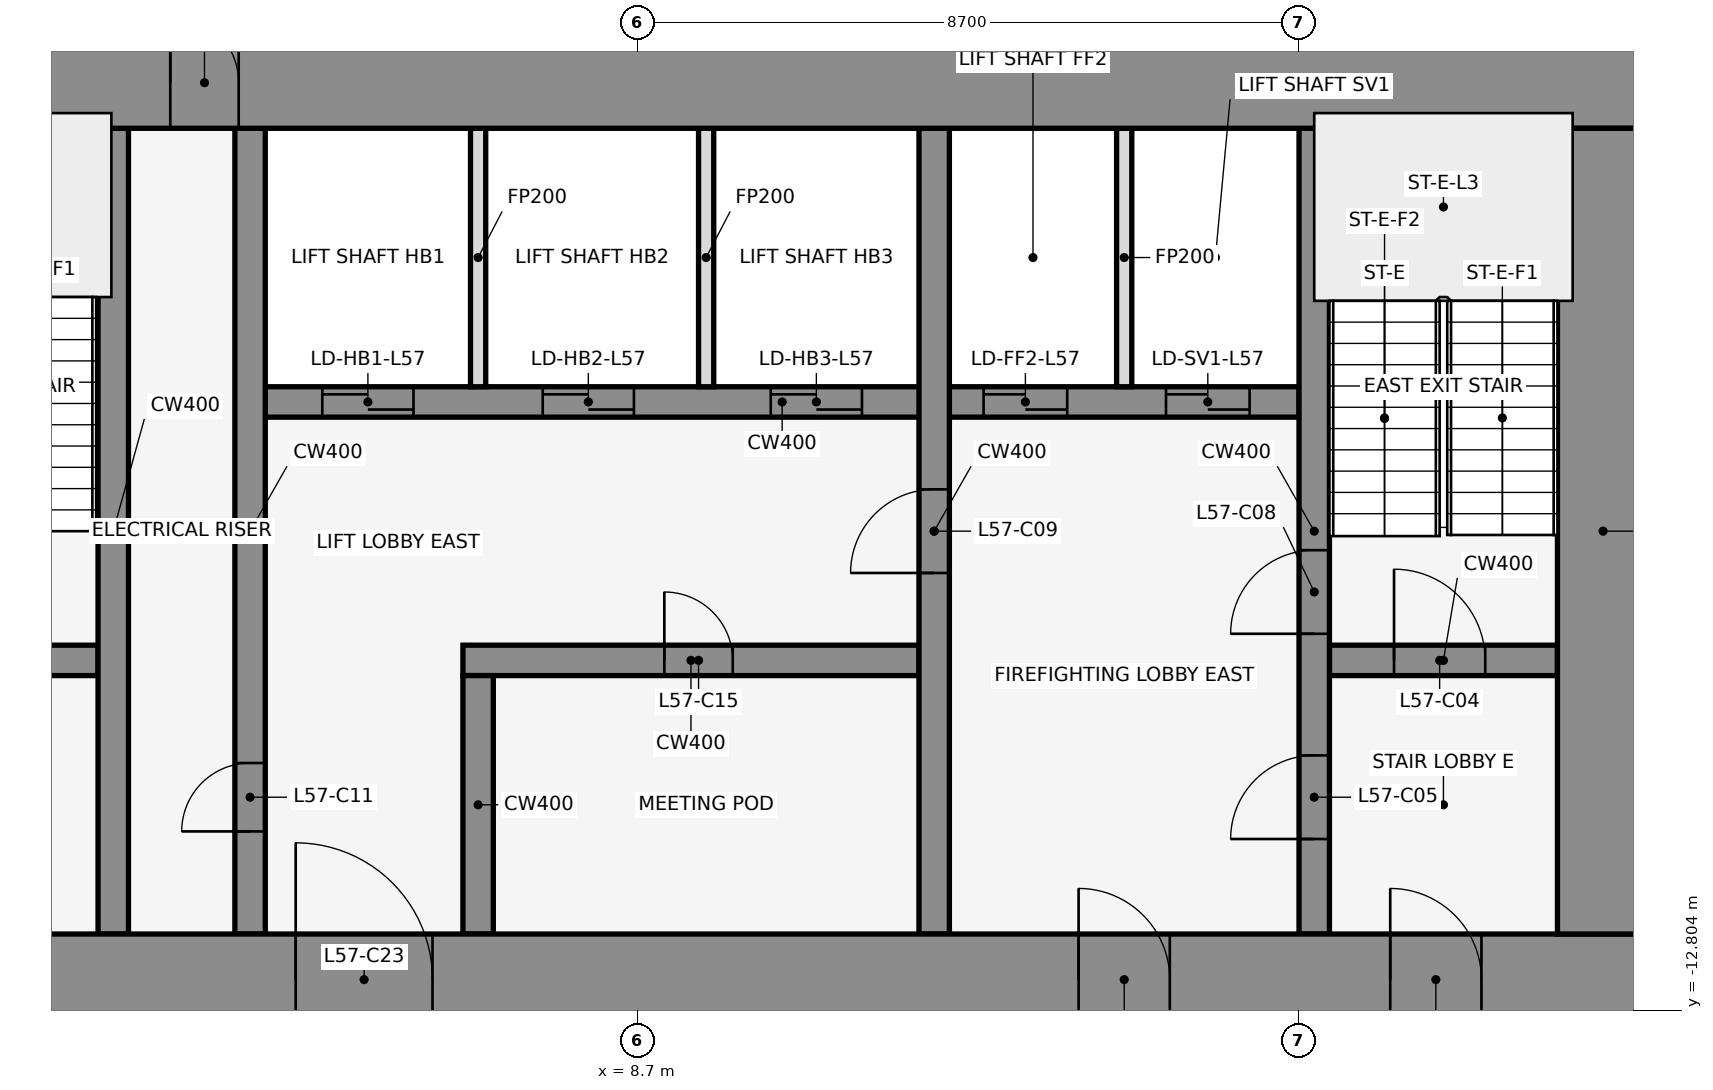
"""IFC4 building model, lengths in metres.
Left out: names, types, materials, properties, quantities, classifications, styles, units other than length and angle.
Written with IfcOpenShell. Run it as: python <this file> out.ifc"""

import sys

from ifc_helpers import new_model, si_unit, direction, frame, frame_2d, origin, place, context, subcontext, project, spatial, rectangle, extrude, element, fill, save


model = new_model("IFC4")
c1 = context("Model", 3, precision=1e-05, world=origin(), true_north=direction((0.0, 1.0)))
c2 = subcontext(c1, "Body", "Model", "MODEL_VIEW")
j1 = project(units=[si_unit("LENGTHUNIT", "METRE"), si_unit("PLANEANGLEUNIT", "RADIAN")], contexts=[c1])
p1 = place(None, origin())
s1 = spatial("IfcSite", under=j1, at=p1, CompositionType="ELEMENT")
p2 = place(p1, origin())
s2 = spatial("IfcBuilding", under=s1, at=p2, CompositionType="ELEMENT")
p3 = place(p2, frame((0.0, 0.0, 254.0)))
s3 = spatial("IfcBuildingStorey", under=s2, at=p3, CompositionType="ELEMENT", Elevation=254.0)
for number, where, z_axis, x_axis in (
    (1, (16.432, -0.105, 0.0), (0.0, 0.0, 1.0), (-0.84, 0.543, 0.0)),
    (2, (1.901, 1.08, 0.0), (0.0, 0.0, 1.0), (-0.84, -0.543, 0.0)),
):
    element("IfcWall", number, at=place(p3, frame(where, z_axis=z_axis, x_axis=x_axis)), inside=s3, PredefinedType="STANDARD", context=c2, shape_type="SweptSolid", body=[
        extrude(rectangle(XDim=2.183, YDim=0.25, at=frame_2d((1.091, 0.0))), origin(), (0.0, 0.0, 1.0), 4.05),
    ])
p4 = place(p3, frame((-1.6, -8.2, 0.0), z_axis=(0.0, 0.0, 1.0), x_axis=(1.0, 0.0, 0.0)))
e3 = element("IfcWall", 3, at=p4, inside=s3, PredefinedType="SHEAR", context=c2, shape_type="SweptSolid", body=[
    extrude(rectangle(XDim=3.2, YDim=0.4, at=frame_2d((1.6, 0.0))), origin(), (0.0, 0.0, 1.0), 4.2),
])
p5 = place(p4, frame((1.05, 0.0, 0.0)))
e4 = element("IfcOpeningElement", 4, at=p5, cuts=e3, PredefinedType="OPENING", context=c2, shape_type="SweptSolid", body=[
    extrude(rectangle(XDim=1.2, YDim=2.1, at=frame_2d((0.6, 1.05))), frame((0.0, 0.212, 0.0), z_axis=(0.0, -1.0, 0.0), x_axis=(1.0, 0.0, 0.0)), (0.0, 0.0, 1.0), 0.424),
])
p6 = place(p3, frame((6.4, -8.2, 0.0), z_axis=(0.0, 0.0, 1.0), x_axis=(1.0, 0.0, 0.0)))
e5 = element("IfcWall", 5, at=p6, inside=s3, PredefinedType="SHEAR", context=c2, shape_type="SweptSolid", body=[
    extrude(rectangle(XDim=6.0, YDim=0.4, at=frame_2d((3.0, 0.0))), origin(), (0.0, 0.0, 1.0), 4.2),
])
p7 = place(p6, frame((2.65, 0.0, 0.0)))
e6 = element("IfcOpeningElement", 6, at=p7, cuts=e5, PredefinedType="OPENING", context=c2, shape_type="SweptSolid", body=[
    extrude(rectangle(XDim=0.9, YDim=2.1, at=frame_2d((0.45, 1.05))), frame((0.0, 0.212, 0.0), z_axis=(0.0, -1.0, 0.0), x_axis=(1.0, 0.0, 0.0)), (0.0, 0.0, 1.0), 0.424),
])
p8 = place(p3, frame((17.8, -8.2, 0.0), z_axis=(0.0, 0.0, 1.0), x_axis=(1.0, 0.0, 0.0)))
e7 = element("IfcWall", 7, at=p8, inside=s3, PredefinedType="SHEAR", context=c2, shape_type="SweptSolid", body=[
    extrude(rectangle(XDim=3.0, YDim=0.4, at=frame_2d((1.5, 0.0))), origin(), (0.0, 0.0, 1.0), 4.2),
])
p9 = place(p8, frame((0.85, 0.0, 0.0)))
e8 = element("IfcOpeningElement", 8, at=p9, cuts=e7, PredefinedType="OPENING", context=c2, shape_type="SweptSolid", body=[
    extrude(rectangle(XDim=1.2, YDim=2.1, at=frame_2d((0.6, 1.05))), frame((0.0, 0.212, 0.0), z_axis=(0.0, -1.0, 0.0), x_axis=(1.0, 0.0, 0.0)), (0.0, 0.0, 1.0), 0.424),
])
p10 = place(p3, frame((3.8, -4.8, 0.0), z_axis=(0.0, 0.0, 1.0), x_axis=(1.0, 0.0, 0.0)))
e9 = element("IfcWall", 9, at=p10, inside=s3, PredefinedType="SHEAR", context=c2, shape_type="SweptSolid", body=[
    extrude(rectangle(XDim=13.6, YDim=0.4, at=frame_2d((6.8, 0.0))), origin(), (0.0, 0.0, 1.0), 4.2),
])
p11 = place(p10, frame((0.75, 0.0, 0.0)))
e10 = element("IfcOpeningElement", 10, at=p11, cuts=e9, PredefinedType="OPENING", context=c2, shape_type="SweptSolid", body=[
    extrude(rectangle(XDim=1.2, YDim=2.1, at=frame_2d((0.6, 1.05))), frame((0.0, 0.212, 0.0), z_axis=(0.0, -1.0, 0.0), x_axis=(1.0, 0.0, 0.0)), (0.0, 0.0, 1.0), 0.424),
])
p12 = place(p10, frame((3.65, 0.0, 0.0)))
e11 = element("IfcOpeningElement", 11, at=p12, cuts=e9, PredefinedType="OPENING", context=c2, shape_type="SweptSolid", body=[
    extrude(rectangle(XDim=1.2, YDim=2.1, at=frame_2d((0.6, 1.05))), frame((0.0, 0.212, 0.0), z_axis=(0.0, -1.0, 0.0), x_axis=(1.0, 0.0, 0.0)), (0.0, 0.0, 1.0), 0.424),
])
p13 = place(p10, frame((6.65, 0.0, 0.0)))
e12 = element("IfcOpeningElement", 12, at=p13, cuts=e9, PredefinedType="OPENING", context=c2, shape_type="SweptSolid", body=[
    extrude(rectangle(XDim=1.2, YDim=2.1, at=frame_2d((0.6, 1.05))), frame((0.0, 0.212, 0.0), z_axis=(0.0, -1.0, 0.0), x_axis=(1.0, 0.0, 0.0)), (0.0, 0.0, 1.0), 0.424),
])
p14 = place(p10, frame((9.45, 0.0, 0.0)))
e13 = element("IfcOpeningElement", 13, at=p14, cuts=e9, PredefinedType="OPENING", context=c2, shape_type="SweptSolid", body=[
    extrude(rectangle(XDim=1.1, YDim=2.1, at=frame_2d((0.55, 1.05))), frame((0.0, 0.212, 0.0), z_axis=(0.0, -1.0, 0.0), x_axis=(1.0, 0.0, 0.0)), (0.0, 0.0, 1.0), 0.424),
])
p15 = place(p10, frame((11.85, 0.0, 0.0)))
e14 = element("IfcOpeningElement", 14, at=p15, cuts=e9, PredefinedType="OPENING", context=c2, shape_type="SweptSolid", body=[
    extrude(rectangle(XDim=1.1, YDim=2.1, at=frame_2d((0.55, 1.05))), frame((0.0, 0.212, 0.0), z_axis=(0.0, -1.0, 0.0), x_axis=(1.0, 0.0, 0.0)), (0.0, 0.0, 1.0), 0.424),
])
p16 = place(p3, frame((1.8, -11.8, 0.0), z_axis=(0.0, 0.0, 1.0), x_axis=(0.0, 1.0, 0.0)))
e15 = element("IfcWall", 15, at=p16, inside=s3, PredefinedType="SHEAR", context=c2, shape_type="SweptSolid", body=[
    extrude(rectangle(XDim=10.6, YDim=0.4, at=frame_2d((5.3, 0.0))), origin(), (0.0, 0.0, 1.0), 4.2),
])
p17 = place(p3, frame((3.6, -11.8, 0.0), z_axis=(0.0, 0.0, 1.0), x_axis=(0.0, 1.0, 0.0)))
e16 = element("IfcWall", 16, at=p17, inside=s3, PredefinedType="SHEAR", context=c2, shape_type="SweptSolid", body=[
    extrude(rectangle(XDim=10.6, YDim=0.4, at=frame_2d((5.3, 0.0))), origin(), (0.0, 0.0, 1.0), 4.2),
])
p18 = place(p17, frame((1.35, 0.0, 0.0)))
e17 = element("IfcOpeningElement", 17, at=p18, cuts=e16, PredefinedType="OPENING", context=c2, shape_type="SweptSolid", body=[
    extrude(rectangle(XDim=0.9, YDim=2.1, at=frame_2d((0.45, 1.05))), frame((0.0, 0.212, 0.0), z_axis=(0.0, -1.0, 0.0), x_axis=(1.0, 0.0, 0.0)), (0.0, 0.0, 1.0), 0.424),
])
p19 = place(p3, frame((6.6, -11.8, 0.0), z_axis=(0.0, 0.0, 1.0), x_axis=(0.0, 1.0, 0.0)))
e18 = element("IfcWall", 18, at=p19, inside=s3, PredefinedType="SHEAR", context=c2, shape_type="SweptSolid", body=[
    extrude(rectangle(XDim=3.4, YDim=0.4, at=frame_2d((1.7, 0.0))), origin(), (0.0, 0.0, 1.0), 4.2),
])
for number, where, z_axis, x_axis in (
    (19, (6.6, -4.6, 0.0), (0.0, 0.0, 1.0), (0.0, 1.0, 0.0)),
    (20, (9.6, -4.6, 0.0), (0.0, 0.0, 1.0), (0.0, 1.0, 0.0)),
):
    element("IfcWall", number, at=place(p3, frame(where, z_axis=z_axis, x_axis=x_axis)), inside=s3, PredefinedType="PARTITIONING", context=c2, shape_type="SweptSolid", body=[
        extrude(rectangle(XDim=3.4, YDim=0.2, at=frame_2d((1.7, 0.0))), origin(), (0.0, 0.0, 1.0), 3.118),
    ])
p20 = place(p3, frame((12.6, -11.8, 0.0), z_axis=(0.0, 0.0, 1.0), x_axis=(0.0, 1.0, 0.0)))
e21 = element("IfcWall", 21, at=p20, inside=s3, PredefinedType="SHEAR", context=c2, shape_type="SweptSolid", body=[
    extrude(rectangle(XDim=10.6, YDim=0.4, at=frame_2d((5.3, 0.0))), origin(), (0.0, 0.0, 1.0), 4.2),
])
p21 = place(p20, frame((4.75, 0.0, 0.0)))
e22 = element("IfcOpeningElement", 22, at=p21, cuts=e21, PredefinedType="OPENING", context=c2, shape_type="SweptSolid", body=[
    extrude(rectangle(XDim=1.1, YDim=2.1, at=frame_2d((0.55, 1.05))), frame((0.0, 0.212, 0.0), z_axis=(0.0, -1.0, 0.0), x_axis=(1.0, 0.0, 0.0)), (0.0, 0.0, 1.0), 0.424),
])
p22 = place(p3, frame((15.1, -4.6, 0.0), z_axis=(0.0, 0.0, 1.0), x_axis=(0.0, 1.0, 0.0)))
e23 = element("IfcWall", 23, at=p22, inside=s3, PredefinedType="PARTITIONING", context=c2, shape_type="SweptSolid", body=[
    extrude(rectangle(XDim=3.4, YDim=0.2, at=frame_2d((1.7, 0.0))), origin(), (0.0, 0.0, 1.0), 3.118),
])
p23 = place(p3, frame((17.6, -11.8, 0.0), z_axis=(0.0, 0.0, 1.0), x_axis=(0.0, 1.0, 0.0)))
e24 = element("IfcWall", 24, at=p23, inside=s3, PredefinedType="SHEAR", context=c2, shape_type="SweptSolid", body=[
    extrude(rectangle(XDim=10.6, YDim=0.4, at=frame_2d((5.3, 0.0))), origin(), (0.0, 0.0, 1.0), 4.2),
])
p24 = place(p23, frame((1.25, 0.0, 0.0)))
e25 = element("IfcOpeningElement", 25, at=p24, cuts=e24, PredefinedType="OPENING", context=c2, shape_type="SweptSolid", body=[
    extrude(rectangle(XDim=1.1, YDim=2.1, at=frame_2d((0.55, 1.05))), frame((0.0, 0.212, 0.0), z_axis=(0.0, -1.0, 0.0), x_axis=(1.0, 0.0, 0.0)), (0.0, 0.0, 1.0), 0.424),
])
p25 = place(p23, frame((3.95, 0.0, 0.0)))
e26 = element("IfcOpeningElement", 26, at=p25, cuts=e24, PredefinedType="OPENING", context=c2, shape_type="SweptSolid", body=[
    extrude(rectangle(XDim=1.1, YDim=2.1, at=frame_2d((0.55, 1.05))), frame((0.0, 0.212, 0.0), z_axis=(0.0, -1.0, 0.0), x_axis=(1.0, 0.0, 0.0)), (0.0, 0.0, 1.0), 0.424),
])
p26 = place(p3, frame((-22.0, -0.6, 0.0), z_axis=(0.0, 0.0, 1.0), x_axis=(1.0, 0.0, 0.0)))
e27 = element("IfcWall", 27, at=p26, inside=s3, PredefinedType="SHEAR", context=c2, shape_type="SweptSolid", body=[
    extrude(rectangle(XDim=44.0, YDim=1.2, at=frame_2d((22.0, 0.0))), origin(), (0.0, 0.0, 1.0), 4.2),
])
p27 = place(p26, frame((18.55, 0.0, 0.0)))
e28 = element("IfcOpeningElement", 28, at=p27, cuts=e27, PredefinedType="OPENING", context=c2, shape_type="SweptSolid", body=[
    extrude(rectangle(XDim=0.9, YDim=2.1, at=frame_2d((0.45, 1.05))), frame((0.0, 0.612, 0.0), z_axis=(0.0, -1.0, 0.0), x_axis=(1.0, 0.0, 0.0)), (0.0, 0.0, 1.0), 1.224),
])
p28 = place(p26, frame((24.55, 0.0, 0.0)))
e29 = element("IfcOpeningElement", 29, at=p28, cuts=e27, PredefinedType="OPENING", context=c2, shape_type="SweptSolid", body=[
    extrude(rectangle(XDim=0.9, YDim=2.1, at=frame_2d((0.45, 1.05))), frame((0.0, 0.612, 0.0), z_axis=(0.0, -1.0, 0.0), x_axis=(1.0, 0.0, 0.0)), (0.0, 0.0, 1.0), 1.224),
])
p29 = place(p3, frame((-22.0, -12.4, 0.0), z_axis=(0.0, 0.0, 1.0), x_axis=(1.0, 0.0, 0.0)))
e30 = element("IfcWall", 30, at=p29, inside=s3, PredefinedType="SHEAR", context=c2, shape_type="SweptSolid", body=[
    extrude(rectangle(XDim=44.0, YDim=1.2, at=frame_2d((22.0, 0.0))), origin(), (0.0, 0.0, 1.0), 4.2),
])
p30 = place(p29, frame((2.2, 0.0, 0.0)))
e31 = element("IfcOpeningElement", 31, at=p30, cuts=e30, PredefinedType="OPENING", context=c2, shape_type="SweptSolid", body=[
    extrude(rectangle(XDim=1.2, YDim=2.1, at=frame_2d((0.6, 1.05))), frame((0.0, 0.612, 0.0), z_axis=(0.0, -1.0, 0.0), x_axis=(1.0, 0.0, 0.0)), (0.0, 0.0, 1.0), 1.224),
])
p31 = place(p29, frame((21.4, 0.0, 0.0)))
e32 = element("IfcOpeningElement", 32, at=p31, cuts=e30, PredefinedType="OPENING", context=c2, shape_type="SweptSolid", body=[
    extrude(rectangle(XDim=1.2, YDim=2.1, at=frame_2d((0.6, 1.05))), frame((0.0, 0.612, 0.0), z_axis=(0.0, -1.0, 0.0), x_axis=(1.0, 0.0, 0.0)), (0.0, 0.0, 1.0), 1.224),
])
p32 = place(p29, frame((40.6, 0.0, 0.0)))
e33 = element("IfcOpeningElement", 33, at=p32, cuts=e30, PredefinedType="OPENING", context=c2, shape_type="SweptSolid", body=[
    extrude(rectangle(XDim=1.2, YDim=2.1, at=frame_2d((0.6, 1.05))), frame((0.0, 0.612, 0.0), z_axis=(0.0, -1.0, 0.0), x_axis=(1.0, 0.0, 0.0)), (0.0, 0.0, 1.0), 1.224),
])
p33 = place(p29, frame((16.0, 0.0, 0.0)))
e34 = element("IfcOpeningElement", 34, at=p33, cuts=e30, PredefinedType="OPENING", context=c2, shape_type="SweptSolid", body=[
    extrude(rectangle(XDim=1.8, YDim=2.1, at=frame_2d((0.9, 1.05))), frame((0.0, 0.612, 0.0), z_axis=(0.0, -1.0, 0.0), x_axis=(1.0, 0.0, 0.0)), (0.0, 0.0, 1.0), 1.224),
])
p34 = place(p29, frame((6.3, 0.0, 0.0)))
e35 = element("IfcOpeningElement", 35, at=p34, cuts=e30, PredefinedType="OPENING", context=c2, shape_type="SweptSolid", body=[
    extrude(rectangle(XDim=1.2, YDim=2.1, at=frame_2d((0.6, 1.05))), frame((0.0, 0.612, 0.0), z_axis=(0.0, -1.0, 0.0), x_axis=(1.0, 0.0, 0.0)), (0.0, 0.0, 1.0), 1.224),
])
p35 = place(p29, frame((26.2, 0.0, 0.0)))
e36 = element("IfcOpeningElement", 36, at=p35, cuts=e30, PredefinedType="OPENING", context=c2, shape_type="SweptSolid", body=[
    extrude(rectangle(XDim=1.8, YDim=2.1, at=frame_2d((0.9, 1.05))), frame((0.0, 0.612, 0.0), z_axis=(0.0, -1.0, 0.0), x_axis=(1.0, 0.0, 0.0)), (0.0, 0.0, 1.0), 1.224),
])
p36 = place(p29, frame((36.5, 0.0, 0.0)))
e37 = element("IfcOpeningElement", 37, at=p36, cuts=e30, PredefinedType="OPENING", context=c2, shape_type="SweptSolid", body=[
    extrude(rectangle(XDim=1.2, YDim=2.1, at=frame_2d((0.6, 1.05))), frame((0.0, 0.612, 0.0), z_axis=(0.0, -1.0, 0.0), x_axis=(1.0, 0.0, 0.0)), (0.0, 0.0, 1.0), 1.224),
])
p37 = place(p3, frame((21.4, -11.8, 0.0), z_axis=(0.0, 0.0, 1.0), x_axis=(0.0, 1.0, 0.0)))
e38 = element("IfcWall", 38, at=p37, inside=s3, PredefinedType="SHEAR", context=c2, shape_type="SweptSolid", body=[
    extrude(rectangle(XDim=10.6, YDim=1.2, at=frame_2d((5.3, 0.0))), origin(), (0.0, 0.0, 1.0), 4.2),
])
p38 = place(p9, origin())
e39 = element("IfcDoor", 39, at=p38, inside=s3, OperationType="SINGLE_SWING_RIGHT", PredefinedType="DOOR", context=c2, shape_type="SweptSolid", body=[
    extrude(rectangle(XDim=1.2, YDim=2.1, at=frame_2d((0.6, 1.05))), frame((0.0, 0.025, 0.0), z_axis=(0.0, -1.0, 0.0), x_axis=(1.0, 0.0, 0.0)), (0.0, 0.0, 1.0), 0.05),
])
fill(e8, e39)
p39 = place(p24, origin())
e40 = element("IfcDoor", 40, at=p39, inside=s3, OperationType="SINGLE_SWING_LEFT", PredefinedType="DOOR", context=c2, shape_type="SweptSolid", body=[
    extrude(rectangle(XDim=1.1, YDim=2.1, at=frame_2d((0.55, 1.05))), frame((0.0, 0.025, 0.0), z_axis=(0.0, -1.0, 0.0), x_axis=(1.0, 0.0, 0.0)), (0.0, 0.0, 1.0), 0.05),
])
fill(e25, e40)
p40 = place(p11, origin())
e41 = element("IfcDoor", 41, at=p40, inside=s3, OperationType="DOUBLE_DOOR_SLIDING", PredefinedType="DOOR", context=c2, shape_type="SweptSolid", body=[
    extrude(rectangle(XDim=1.2, YDim=2.1, at=frame_2d((0.6, 1.05))), frame((0.0, 0.025, 0.0), z_axis=(0.0, -1.0, 0.0), x_axis=(1.0, 0.0, 0.0)), (0.0, 0.0, 1.0), 0.05),
])
fill(e10, e41)
p41 = place(p12, origin())
e42 = element("IfcDoor", 42, at=p41, inside=s3, OperationType="DOUBLE_DOOR_SLIDING", PredefinedType="DOOR", context=c2, shape_type="SweptSolid", body=[
    extrude(rectangle(XDim=1.2, YDim=2.1, at=frame_2d((0.6, 1.05))), frame((0.0, 0.025, 0.0), z_axis=(0.0, -1.0, 0.0), x_axis=(1.0, 0.0, 0.0)), (0.0, 0.0, 1.0), 0.05),
])
fill(e11, e42)
p42 = place(p13, origin())
e43 = element("IfcDoor", 43, at=p42, inside=s3, OperationType="DOUBLE_DOOR_SLIDING", PredefinedType="DOOR", context=c2, shape_type="SweptSolid", body=[
    extrude(rectangle(XDim=1.2, YDim=2.1, at=frame_2d((0.6, 1.05))), frame((0.0, 0.025, 0.0), z_axis=(0.0, -1.0, 0.0), x_axis=(1.0, 0.0, 0.0)), (0.0, 0.0, 1.0), 0.05),
])
fill(e12, e43)
p43 = place(p14, origin())
e44 = element("IfcDoor", 44, at=p43, inside=s3, OperationType="DOUBLE_DOOR_SLIDING", PredefinedType="DOOR", context=c2, shape_type="SweptSolid", body=[
    extrude(rectangle(XDim=1.1, YDim=2.1, at=frame_2d((0.55, 1.05))), frame((0.0, 0.025, 0.0), z_axis=(0.0, -1.0, 0.0), x_axis=(1.0, 0.0, 0.0)), (0.0, 0.0, 1.0), 0.05),
])
fill(e13, e44)
p44 = place(p15, origin())
e45 = element("IfcDoor", 45, at=p44, inside=s3, OperationType="DOUBLE_DOOR_SLIDING", PredefinedType="DOOR", context=c2, shape_type="SweptSolid", body=[
    extrude(rectangle(XDim=1.1, YDim=2.1, at=frame_2d((0.55, 1.05))), frame((0.0, 0.025, 0.0), z_axis=(0.0, -1.0, 0.0), x_axis=(1.0, 0.0, 0.0)), (0.0, 0.0, 1.0), 0.05),
])
fill(e14, e45)
p45 = place(p25, origin())
e46 = element("IfcDoor", 46, at=p45, inside=s3, OperationType="SINGLE_SWING_RIGHT", PredefinedType="DOOR", context=c2, shape_type="SweptSolid", body=[
    extrude(rectangle(XDim=1.1, YDim=2.1, at=frame_2d((0.55, 1.05))), frame((0.0, 0.025, 0.0), z_axis=(0.0, -1.0, 0.0), x_axis=(1.0, 0.0, 0.0)), (0.0, 0.0, 1.0), 0.05),
])
fill(e26, e46)
p46 = place(p21, frame((1.1, 0.0, 0.0), z_axis=(0.0, 0.0, 1.0), x_axis=(-1.0, 0.0, 0.0)))
e47 = element("IfcDoor", 47, at=p46, inside=s3, OperationType="SINGLE_SWING_RIGHT", PredefinedType="DOOR", context=c2, shape_type="SweptSolid", body=[
    extrude(rectangle(XDim=1.1, YDim=2.1, at=frame_2d((0.55, 1.05))), frame((0.0, 0.025, 0.0), z_axis=(0.0, -1.0, 0.0), x_axis=(1.0, 0.0, 0.0)), (0.0, 0.0, 1.0), 0.05),
])
fill(e22, e47)
p47 = place(p18, origin())
e48 = element("IfcDoor", 48, at=p47, inside=s3, OperationType="SINGLE_SWING_LEFT", PredefinedType="DOOR", context=c2, shape_type="SweptSolid", body=[
    extrude(rectangle(XDim=0.9, YDim=2.1, at=frame_2d((0.45, 1.05))), frame((0.0, 0.025, 0.0), z_axis=(0.0, -1.0, 0.0), x_axis=(1.0, 0.0, 0.0)), (0.0, 0.0, 1.0), 0.05),
])
fill(e17, e48)
p48 = place(p7, frame((0.9, 0.0, 0.0), z_axis=(0.0, 0.0, 1.0), x_axis=(-1.0, 0.0, 0.0)))
e49 = element("IfcDoor", 49, at=p48, inside=s3, OperationType="SINGLE_SWING_RIGHT", PredefinedType="DOOR", context=c2, shape_type="SweptSolid", body=[
    extrude(rectangle(XDim=0.9, YDim=2.1, at=frame_2d((0.45, 1.05))), frame((0.0, 0.025, 0.0), z_axis=(0.0, -1.0, 0.0), x_axis=(1.0, 0.0, 0.0)), (0.0, 0.0, 1.0), 0.05),
])
fill(e6, e49)
p49 = place(p28, origin())
e50 = element("IfcDoor", 50, at=p49, inside=s3, OperationType="SINGLE_SWING_LEFT", PredefinedType="DOOR", context=c2, shape_type="SweptSolid", body=[
    extrude(rectangle(XDim=0.9, YDim=2.1, at=frame_2d((0.45, 1.05))), frame((0.0, 0.025, 0.0), z_axis=(0.0, -1.0, 0.0), x_axis=(1.0, 0.0, 0.0)), (0.0, 0.0, 1.0), 0.05),
])
fill(e29, e50)
p50 = place(p32, frame((1.2, 0.0, 0.0), z_axis=(0.0, 0.0, 1.0), x_axis=(-1.0, 0.0, 0.0)))
e51 = element("IfcDoor", 51, at=p50, inside=s3, OperationType="SINGLE_SWING_RIGHT", PredefinedType="DOOR", context=c2, shape_type="SweptSolid", body=[
    extrude(rectangle(XDim=1.2, YDim=2.1, at=frame_2d((0.6, 1.05))), frame((0.0, 0.025, 0.0), z_axis=(0.0, -1.0, 0.0), x_axis=(1.0, 0.0, 0.0)), (0.0, 0.0, 1.0), 0.05),
])
fill(e33, e51)
p51 = place(p35, origin())
e52 = element("IfcDoor", 52, at=p51, inside=s3, OperationType="SINGLE_SWING_LEFT", PredefinedType="DOOR", context=c2, shape_type="SweptSolid", body=[
    extrude(rectangle(XDim=1.8, YDim=2.1, at=frame_2d((0.9, 1.05))), frame((0.0, 0.025, 0.0), z_axis=(0.0, -1.0, 0.0), x_axis=(1.0, 0.0, 0.0)), (0.0, 0.0, 1.0), 0.05),
])
fill(e36, e52)
p52 = place(p36, frame((1.2, 0.0, 0.0), z_axis=(0.0, 0.0, 1.0), x_axis=(-1.0, 0.0, 0.0)))
e53 = element("IfcDoor", 53, at=p52, inside=s3, OperationType="SINGLE_SWING_RIGHT", PredefinedType="DOOR", context=c2, shape_type="SweptSolid", body=[
    extrude(rectangle(XDim=1.2, YDim=2.1, at=frame_2d((0.6, 1.05))), frame((0.0, 0.025, 0.0), z_axis=(0.0, -1.0, 0.0), x_axis=(1.0, 0.0, 0.0)), (0.0, 0.0, 1.0), 0.05),
])
fill(e37, e53)
save(model, sys.argv[1])
